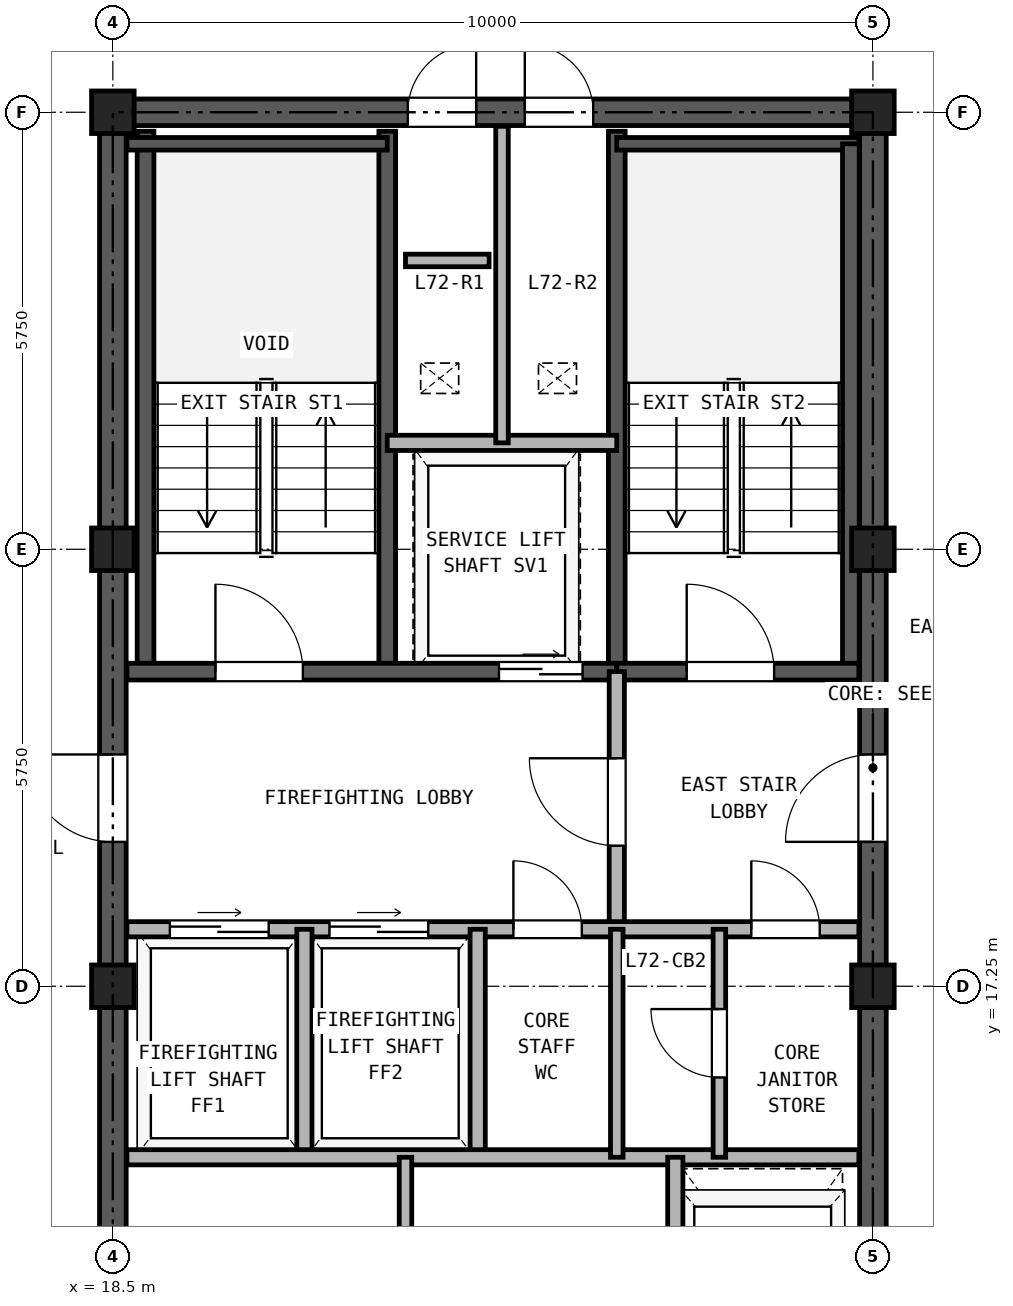
"""IFC4 building model, lengths in metres.
Left out: names, types, materials, properties, quantities, classifications, styles, units other than length and angle.
Written with IfcOpenShell. Run it as: python <this file> out.ifc"""

import sys

from ifc_helpers import new_model, si_unit, direction, frame, frame_2d, origin, origin_2d, place, context, subcontext, project, spatial, rectangle, hollow_rectangle, extrude, source, transform, mapped, element, fill, save


model = new_model("IFC4")
c1 = context("Model", 3, precision=1e-05, world=origin(), true_north=direction((0.0, 1.0)))
c2 = subcontext(c1, "Body", "Model", "MODEL_VIEW")
j1 = project(units=[si_unit("LENGTHUNIT", "METRE"), si_unit("PLANEANGLEUNIT", "RADIAN")], contexts=[c1])
p1 = place(None, origin())
s1 = spatial("IfcSite", under=j1, at=p1, CompositionType="ELEMENT")
p2 = place(p1, origin())
s2 = spatial("IfcBuilding", under=s1, at=p2, CompositionType="ELEMENT")
p3 = place(p2, frame((0.0, 0.0, 252.1)))
s3 = spatial("IfcBuildingStorey", under=s2, at=p3, CompositionType="ELEMENT", Elevation=252.1)
m1 = source(origin(), c2, "Body", "SweptSolid", [
    extrude(hollow_rectangle(XDim=0.56, YDim=0.56, WallThickness=0.03, at=origin_2d()), origin(), (0.0, 0.0, 1.0), 2.98),
])
for number, where, z_axis, x_axis in (
    (1, (18.5, 17.25, 0.0), (0.0, 0.0, 1.0), (1.0, 0.0, 0.0)),
    (2, (18.5, 23.0, 0.0), (0.0, 0.0, 1.0), (1.0, 0.0, 0.0)),
    (3, (18.5, 28.75, 0.0), (0.0, 0.0, 1.0), (1.0, 0.0, 0.0)),
    (4, (28.5, 17.25, 0.0), (0.0, 0.0, 1.0), (1.0, 0.0, 0.0)),
    (5, (28.5, 23.0, 0.0), (0.0, 0.0, 1.0), (1.0, 0.0, 0.0)),
    (6, (28.5, 28.75, 0.0), (0.0, 0.0, 1.0), (1.0, 0.0, 0.0)),
):
    element("IfcColumn", number, at=place(p3, frame(where, z_axis=z_axis, x_axis=x_axis)), inside=s3, PredefinedType="COLUMN", context=c2, shape_type="MappedRepresentation", body=[
        mapped(m1, transform((0.0, 0.0, 0.0), x_axis=(1.0, 0.0, 0.0), y_axis=(0.0, 1.0, 0.0), z_axis=(0.0, 0.0, 1.0), scale=1.0)),
    ])
p4 = place(p3, frame((18.325, 28.75, 0.0), z_axis=(0.0, 0.0, 1.0), x_axis=(1.0, 0.0, 0.0)))
e7 = element("IfcWall", 7, at=p4, inside=s3, PredefinedType="SHEAR", context=c2, shape_type="SweptSolid", body=[
    extrude(rectangle(XDim=10.35, YDim=0.35, at=frame_2d((5.175, 0.0))), origin(), (0.0, 0.0, 1.0), 2.98),
])
p5 = place(p4, frame((4.055, 0.0, 0.0)))
e8 = element("IfcOpeningElement", 8, at=p5, cuts=e7, PredefinedType="OPENING", context=c2, shape_type="SweptSolid", body=[
    extrude(rectangle(XDim=0.9, YDim=2.05, at=frame_2d((0.45, 1.025))), frame((0.0, 0.185, 0.0), z_axis=(0.0, -1.0, 0.0), x_axis=(1.0, 0.0, 0.0)), (0.0, 0.0, 1.0), 0.37),
])
p6 = place(p4, frame((5.595, 0.0, 0.0)))
e9 = element("IfcOpeningElement", 9, at=p6, cuts=e7, PredefinedType="OPENING", context=c2, shape_type="SweptSolid", body=[
    extrude(rectangle(XDim=0.9, YDim=2.05, at=frame_2d((0.45, 1.025))), frame((0.0, 0.185, 0.0), z_axis=(0.0, -1.0, 0.0), x_axis=(1.0, 0.0, 0.0)), (0.0, 0.0, 1.0), 0.37),
])
p7 = place(p3, frame((18.5, 11.675, 0.0), z_axis=(0.0, 0.0, 1.0), x_axis=(0.0, 1.0, 0.0)))
e10 = element("IfcWall", 10, at=p7, inside=s3, PredefinedType="SHEAR", context=c2, shape_type="SweptSolid", body=[
    extrude(rectangle(XDim=16.9, YDim=0.35, at=frame_2d((8.45, 0.0))), origin(), (0.0, 0.0, 1.0), 2.98),
])
p8 = place(p7, frame((7.475, 0.0, 0.0)))
e11 = element("IfcOpeningElement", 11, at=p8, cuts=e10, PredefinedType="OPENING", context=c2, shape_type="SweptSolid", body=[
    extrude(rectangle(XDim=1.15, YDim=2.2, at=frame_2d((0.575, 1.1))), frame((0.0, 0.185, 0.0), z_axis=(0.0, -1.0, 0.0), x_axis=(1.0, 0.0, 0.0)), (0.0, 0.0, 1.0), 0.37),
])
p9 = place(p3, frame((28.5, 11.675, 0.0), z_axis=(0.0, 0.0, 1.0), x_axis=(0.0, 1.0, 0.0)))
e12 = element("IfcWall", 12, at=p9, inside=s3, PredefinedType="SHEAR", context=c2, shape_type="SweptSolid", body=[
    extrude(rectangle(XDim=16.9, YDim=0.35, at=frame_2d((8.45, 0.0))), origin(), (0.0, 0.0, 1.0), 2.98),
])
p10 = place(p9, frame((7.475, 0.0, 0.0)))
e13 = element("IfcOpeningElement", 13, at=p10, cuts=e12, PredefinedType="OPENING", context=c2, shape_type="SweptSolid", body=[
    extrude(rectangle(XDim=1.15, YDim=2.2, at=frame_2d((0.575, 1.1))), frame((0.0, 0.185, 0.0), z_axis=(0.0, -1.0, 0.0), x_axis=(1.0, 0.0, 0.0)), (0.0, 0.0, 1.0), 0.37),
])
for number, where, z_axis, x_axis in (
    (14, (18.93, 21.39, 0.0), (0.0, 0.0, 1.0), (0.0, 1.0, 0.0)),
    (15, (22.11, 21.39, 0.0), (0.0, 0.0, 1.0), (0.0, 1.0, 0.0)),
    (16, (25.13, 21.39, 0.0), (0.0, 0.0, 1.0), (0.0, 1.0, 0.0)),
):
    element("IfcWall", number, at=place(p3, frame(where, z_axis=z_axis, x_axis=x_axis)), inside=s3, PredefinedType="SOLIDWALL", context=c2, shape_type="SweptSolid", body=[
        extrude(rectangle(XDim=7.11, YDim=0.22, at=frame_2d((3.555, 0.0))), origin(), (0.0, 0.0, 1.0), 2.98),
    ])
p11 = place(p3, frame((18.685, 28.335, 0.0), z_axis=(0.0, 0.0, 1.0), x_axis=(1.0, 0.0, 0.0)))
e17 = element("IfcWall", 17, at=p11, inside=s3, PredefinedType="PARTITIONING", context=c2, shape_type="SweptSolid", body=[
    extrude(rectangle(XDim=3.425, YDim=0.165, at=frame_2d((1.712, 0.0))), origin(), (0.0, 0.0, 1.0), 2.98),
])
p12 = place(p3, frame((25.13, 28.335, 0.0), z_axis=(0.0, 0.0, 1.0), x_axis=(1.0, 0.0, 0.0)))
e18 = element("IfcWall", 18, at=p12, inside=s3, PredefinedType="PARTITIONING", context=c2, shape_type="SweptSolid", body=[
    extrude(rectangle(XDim=3.185, YDim=0.165, at=frame_2d((1.593, 0.0))), origin(), (0.0, 0.0, 1.0), 2.98),
])
p13 = place(p3, frame((28.21, 21.39, 0.0), z_axis=(0.0, 0.0, 1.0), x_axis=(0.0, 1.0, 0.0)))
e19 = element("IfcWall", 19, at=p13, inside=s3, PredefinedType="SOLIDWALL", context=c2, shape_type="SweptSolid", body=[
    extrude(rectangle(XDim=6.945, YDim=0.22, at=frame_2d((3.473, 0.0))), origin(), (0.0, 0.0, 1.0), 2.98),
])
p14 = place(p3, frame((18.685, 21.39, 0.0), z_axis=(0.0, 0.0, 1.0), x_axis=(1.0, 0.0, 0.0)))
e20 = element("IfcWall", 20, at=p14, inside=s3, PredefinedType="SOLIDWALL", context=c2, shape_type="SweptSolid", body=[
    extrude(rectangle(XDim=6.445, YDim=0.22, at=frame_2d((3.222, 0.0))), origin(), (0.0, 0.0, 1.0), 2.98),
])
p15 = place(p14, frame((1.165, 0.0, 0.0)))
e21 = element("IfcOpeningElement", 21, at=p15, cuts=e20, PredefinedType="OPENING", context=c2, shape_type="SweptSolid", body=[
    extrude(rectangle(XDim=1.15, YDim=2.2, at=frame_2d((0.575, 1.1))), frame((0.0, 0.12, 0.0), z_axis=(0.0, -1.0, 0.0), x_axis=(1.0, 0.0, 0.0)), (0.0, 0.0, 1.0), 0.24),
])
p16 = place(p14, frame((4.895, 0.0, 0.0)))
e22 = element("IfcOpeningElement", 22, at=p16, cuts=e20, PredefinedType="OPENING", context=c2, shape_type="SweptSolid", body=[
    extrude(rectangle(XDim=1.1, YDim=2.25, at=frame_2d((0.55, 1.125))), frame((0.0, 0.12, 0.0), z_axis=(0.0, -1.0, 0.0), x_axis=(1.0, 0.0, 0.0)), (0.0, 0.0, 1.0), 0.24),
])
p17 = place(p3, frame((25.13, 21.39, 0.0), z_axis=(0.0, 0.0, 1.0), x_axis=(1.0, 0.0, 0.0)))
e23 = element("IfcWall", 23, at=p17, inside=s3, PredefinedType="SOLIDWALL", context=c2, shape_type="SweptSolid", body=[
    extrude(rectangle(XDim=3.185, YDim=0.22, at=frame_2d((1.593, 0.0))), origin(), (0.0, 0.0, 1.0), 2.98),
])
p18 = place(p17, frame((0.92, 0.0, 0.0)))
e24 = element("IfcOpeningElement", 24, at=p18, cuts=e23, PredefinedType="OPENING", context=c2, shape_type="SweptSolid", body=[
    extrude(rectangle(XDim=1.15, YDim=2.2, at=frame_2d((0.575, 1.1))), frame((0.0, 0.12, 0.0), z_axis=(0.0, -1.0, 0.0), x_axis=(1.0, 0.0, 0.0)), (0.0, 0.0, 1.0), 0.24),
])
p19 = place(p3, frame((22.11, 24.4, 0.0), z_axis=(0.0, 0.0, 1.0), x_axis=(1.0, 0.0, 0.0)))
e25 = element("IfcWall", 25, at=p19, inside=s3, PredefinedType="PARTITIONING", context=c2, shape_type="SweptSolid", body=[
    extrude(rectangle(XDim=3.02, YDim=0.2, at=frame_2d((1.51, 0.0))), origin(), (0.0, 0.0, 1.0), 2.98),
])
p20 = place(p3, frame((23.62, 24.4, 0.0), z_axis=(0.0, 0.0, 1.0), x_axis=(0.0, 1.0, 0.0)))
e26 = element("IfcWall", 26, at=p20, inside=s3, PredefinedType="PARTITIONING", context=c2, shape_type="SweptSolid", body=[
    extrude(rectangle(XDim=4.165, YDim=0.165, at=frame_2d((2.083, 0.0))), origin(), (0.0, 0.0, 1.0), 2.98),
])
p21 = place(p3, frame((25.13, 18.0, 0.0), z_axis=(0.0, 0.0, 1.0), x_axis=(0.0, 1.0, 0.0)))
e27 = element("IfcWall", 27, at=p21, inside=s3, PredefinedType="PARTITIONING", context=c2, shape_type="SweptSolid", body=[
    extrude(rectangle(XDim=3.39, YDim=0.2, at=frame_2d((1.695, 0.0))), origin(), (0.0, 0.0, 1.0), 2.98),
])
p22 = place(p21, frame((1.1, 0.0, 0.0)))
e28 = element("IfcOpeningElement", 28, at=p22, cuts=e27, PredefinedType="OPENING", context=c2, shape_type="SweptSolid", body=[
    extrude(rectangle(XDim=1.15, YDim=2.2, at=frame_2d((0.575, 1.1))), frame((0.0, 0.11, 0.0), z_axis=(0.0, -1.0, 0.0), x_axis=(1.0, 0.0, 0.0)), (0.0, 0.0, 1.0), 0.22),
])
p23 = place(p3, frame((18.685, 18.0, 0.0), z_axis=(0.0, 0.0, 1.0), x_axis=(1.0, 0.0, 0.0)))
e29 = element("IfcWall", 29, at=p23, inside=s3, PredefinedType="PARTITIONING", context=c2, shape_type="SweptSolid", body=[
    extrude(rectangle(XDim=9.63, YDim=0.2, at=frame_2d((4.815, 0.0))), origin(), (0.0, 0.0, 1.0), 2.98),
])
p24 = place(p23, frame((0.565, 0.0, 0.0)))
e30 = element("IfcOpeningElement", 30, at=p24, cuts=e29, PredefinedType="OPENING", context=c2, shape_type="SweptSolid", body=[
    extrude(rectangle(XDim=1.3, YDim=2.3, at=frame_2d((0.65, 1.15))), frame((0.0, 0.11, 0.0), z_axis=(0.0, -1.0, 0.0), x_axis=(1.0, 0.0, 0.0)), (0.0, 0.0, 1.0), 0.22),
])
p25 = place(p23, frame((2.665, 0.0, 0.0)))
e31 = element("IfcOpeningElement", 31, at=p25, cuts=e29, PredefinedType="OPENING", context=c2, shape_type="SweptSolid", body=[
    extrude(rectangle(XDim=1.3, YDim=2.3, at=frame_2d((0.65, 1.15))), frame((0.0, 0.11, 0.0), z_axis=(0.0, -1.0, 0.0), x_axis=(1.0, 0.0, 0.0)), (0.0, 0.0, 1.0), 0.22),
])
p26 = place(p23, frame((5.085, 0.0, 0.0)))
e32 = element("IfcOpeningElement", 32, at=p26, cuts=e29, PredefinedType="OPENING", context=c2, shape_type="SweptSolid", body=[
    extrude(rectangle(XDim=0.9, YDim=2.05, at=frame_2d((0.45, 1.025))), frame((0.0, 0.11, 0.0), z_axis=(0.0, -1.0, 0.0), x_axis=(1.0, 0.0, 0.0)), (0.0, 0.0, 1.0), 0.22),
])
p27 = place(p23, frame((8.215, 0.0, 0.0)))
e33 = element("IfcOpeningElement", 33, at=p27, cuts=e29, PredefinedType="OPENING", context=c2, shape_type="SweptSolid", body=[
    extrude(rectangle(XDim=0.9, YDim=2.05, at=frame_2d((0.45, 1.025))), frame((0.0, 0.11, 0.0), z_axis=(0.0, -1.0, 0.0), x_axis=(1.0, 0.0, 0.0)), (0.0, 0.0, 1.0), 0.22),
])
for number, where, z_axis, x_axis in (
    (34, (21.02, 15.0, 0.0), (0.0, 0.0, 1.0), (0.0, 1.0, 0.0)),
    (35, (23.3, 15.0, 0.0), (0.0, 0.0, 1.0), (0.0, 1.0, 0.0)),
):
    element("IfcWall", number, at=place(p3, frame(where, z_axis=z_axis, x_axis=x_axis)), inside=s3, PredefinedType="PARTITIONING", context=c2, shape_type="SweptSolid", body=[
        extrude(rectangle(XDim=3.0, YDim=0.2, at=frame_2d((1.5, 0.0))), origin(), (0.0, 0.0, 1.0), 2.98),
    ])
p28 = place(p3, frame((18.685, 15.0, 0.0), z_axis=(0.0, 0.0, 1.0), x_axis=(1.0, 0.0, 0.0)))
e36 = element("IfcWall", 36, at=p28, inside=s3, PredefinedType="PARTITIONING", context=c2, shape_type="SweptSolid", body=[
    extrude(rectangle(XDim=9.63, YDim=0.2, at=frame_2d((4.815, 0.0))), origin(), (0.0, 0.0, 1.0), 2.98),
])
p29 = place(p3, frame((25.13, 15.0, 0.0), z_axis=(0.0, 0.0, 1.0), x_axis=(0.0, 1.0, 0.0)))
e37 = element("IfcWall", 37, at=p29, inside=s3, PredefinedType="PARTITIONING", context=c2, shape_type="SweptSolid", body=[
    extrude(rectangle(XDim=3.0, YDim=0.165, at=frame_2d((1.5, 0.0))), origin(), (0.0, 0.0, 1.0), 2.98),
])
p30 = place(p3, frame((26.48, 15.0, 0.0), z_axis=(0.0, 0.0, 1.0), x_axis=(0.0, 1.0, 0.0)))
e38 = element("IfcWall", 38, at=p30, inside=s3, PredefinedType="PARTITIONING", context=c2, shape_type="SweptSolid", body=[
    extrude(rectangle(XDim=3.0, YDim=0.165, at=frame_2d((1.5, 0.0))), origin(), (0.0, 0.0, 1.0), 2.98),
])
p31 = place(p30, frame((1.05, 0.0, 0.0)))
e39 = element("IfcOpeningElement", 39, at=p31, cuts=e38, PredefinedType="OPENING", context=c2, shape_type="SweptSolid", body=[
    extrude(rectangle(XDim=0.9, YDim=2.05, at=frame_2d((0.45, 1.025))), frame((0.0, 0.093, 0.0), z_axis=(0.0, -1.0, 0.0), x_axis=(1.0, 0.0, 0.0)), (0.0, 0.0, 1.0), 0.185),
])
p32 = place(p3, frame((22.35, 11.685, 0.0), z_axis=(0.0, 0.0, 1.0), x_axis=(0.0, 1.0, 0.0)))
e40 = element("IfcWall", 40, at=p32, inside=s3, PredefinedType="PARTITIONING", context=c2, shape_type="SweptSolid", body=[
    extrude(rectangle(XDim=3.315, YDim=0.165, at=frame_2d((1.657, 0.0))), origin(), (0.0, 0.0, 1.0), 2.98),
])
p33 = place(p3, frame((25.9, 11.685, 0.0), z_axis=(0.0, 0.0, 1.0), x_axis=(0.0, 1.0, 0.0)))
e41 = element("IfcWall", 41, at=p33, inside=s3, PredefinedType="PARTITIONING", context=c2, shape_type="SweptSolid", body=[
    extrude(rectangle(XDim=3.315, YDim=0.2, at=frame_2d((1.657, 0.0))), origin(), (0.0, 0.0, 1.0), 2.98),
])
p34 = place(p3, frame((22.35, 26.8, 0.0), z_axis=(0.0, 0.0, 1.0), x_axis=(1.0, 0.0, 0.0)))
e42 = element("IfcWall", 42, at=p34, inside=s3, PredefinedType="PARTITIONING", context=c2, shape_type="SweptSolid", body=[
    extrude(rectangle(XDim=1.1, YDim=0.165, at=frame_2d((0.55, 0.0))), origin(), (0.0, 0.0, 1.0), 2.98),
])
p35 = place(p15, frame((1.15, 0.0, 0.0), z_axis=(0.0, 0.0, 1.0), x_axis=(-1.0, 0.0, 0.0)))
e43 = element("IfcDoor", 43, at=p35, inside=s3, OperationType="SINGLE_SWING_LEFT", PredefinedType="DOOR", context=c2, shape_type="SweptSolid", body=[
    extrude(rectangle(XDim=1.15, YDim=2.2, at=frame_2d((0.575, 1.1))), frame((0.0, 0.025, 0.0), z_axis=(0.0, -1.0, 0.0), x_axis=(1.0, 0.0, 0.0)), (0.0, 0.0, 1.0), 0.05),
])
fill(e21, e43)
p36 = place(p18, frame((1.15, 0.0, 0.0), z_axis=(0.0, 0.0, 1.0), x_axis=(-1.0, 0.0, 0.0)))
e44 = element("IfcDoor", 44, at=p36, inside=s3, OperationType="SINGLE_SWING_LEFT", PredefinedType="DOOR", context=c2, shape_type="SweptSolid", body=[
    extrude(rectangle(XDim=1.15, YDim=2.2, at=frame_2d((0.575, 1.1))), frame((0.0, 0.025, 0.0), z_axis=(0.0, -1.0, 0.0), x_axis=(1.0, 0.0, 0.0)), (0.0, 0.0, 1.0), 0.05),
])
fill(e24, e44)
p37 = place(p16, frame((1.1, 0.0, 0.0), z_axis=(0.0, 0.0, 1.0), x_axis=(-1.0, 0.0, 0.0)))
e45 = element("IfcDoor", 45, at=p37, inside=s3, OperationType="DOUBLE_DOOR_SLIDING", PredefinedType="DOOR", context=c2, shape_type="SweptSolid", body=[
    extrude(rectangle(XDim=1.1, YDim=2.25, at=frame_2d((0.55, 1.125))), frame((0.0, 0.025, 0.0), z_axis=(0.0, -1.0, 0.0), x_axis=(1.0, 0.0, 0.0)), (0.0, 0.0, 1.0), 0.05),
])
fill(e22, e45)
p38 = place(p22, origin())
e46 = element("IfcDoor", 46, at=p38, inside=s3, OperationType="SINGLE_SWING_RIGHT", PredefinedType="DOOR", context=c2, shape_type="SweptSolid", body=[
    extrude(rectangle(XDim=1.15, YDim=2.2, at=frame_2d((0.575, 1.1))), frame((0.0, 0.025, 0.0), z_axis=(0.0, -1.0, 0.0), x_axis=(1.0, 0.0, 0.0)), (0.0, 0.0, 1.0), 0.05),
])
fill(e28, e46)
p39 = place(p24, origin())
e47 = element("IfcDoor", 47, at=p39, inside=s3, OperationType="DOUBLE_DOOR_SLIDING", PredefinedType="DOOR", context=c2, shape_type="SweptSolid", body=[
    extrude(rectangle(XDim=1.3, YDim=2.3, at=frame_2d((0.65, 1.15))), frame((0.0, 0.025, 0.0), z_axis=(0.0, -1.0, 0.0), x_axis=(1.0, 0.0, 0.0)), (0.0, 0.0, 1.0), 0.05),
])
fill(e30, e47)
p40 = place(p25, origin())
e48 = element("IfcDoor", 48, at=p40, inside=s3, OperationType="DOUBLE_DOOR_SLIDING", PredefinedType="DOOR", context=c2, shape_type="SweptSolid", body=[
    extrude(rectangle(XDim=1.3, YDim=2.3, at=frame_2d((0.65, 1.15))), frame((0.0, 0.025, 0.0), z_axis=(0.0, -1.0, 0.0), x_axis=(1.0, 0.0, 0.0)), (0.0, 0.0, 1.0), 0.05),
])
fill(e31, e48)
p41 = place(p26, frame((0.9, 0.0, 0.0), z_axis=(0.0, 0.0, 1.0), x_axis=(-1.0, 0.0, 0.0)))
e49 = element("IfcDoor", 49, at=p41, inside=s3, OperationType="SINGLE_SWING_LEFT", PredefinedType="DOOR", context=c2, shape_type="SweptSolid", body=[
    extrude(rectangle(XDim=0.9, YDim=2.05, at=frame_2d((0.45, 1.025))), frame((0.0, 0.025, 0.0), z_axis=(0.0, -1.0, 0.0), x_axis=(1.0, 0.0, 0.0)), (0.0, 0.0, 1.0), 0.05),
])
fill(e32, e49)
p42 = place(p31, origin())
e50 = element("IfcDoor", 50, at=p42, inside=s3, OperationType="SINGLE_SWING_RIGHT", PredefinedType="DOOR", context=c2, shape_type="SweptSolid", body=[
    extrude(rectangle(XDim=0.9, YDim=2.05, at=frame_2d((0.45, 1.025))), frame((0.0, 0.025, 0.0), z_axis=(0.0, -1.0, 0.0), x_axis=(1.0, 0.0, 0.0)), (0.0, 0.0, 1.0), 0.05),
])
fill(e39, e50)
p43 = place(p27, frame((0.9, 0.0, 0.0), z_axis=(0.0, 0.0, 1.0), x_axis=(-1.0, 0.0, 0.0)))
e51 = element("IfcDoor", 51, at=p43, inside=s3, OperationType="SINGLE_SWING_LEFT", PredefinedType="DOOR", context=c2, shape_type="SweptSolid", body=[
    extrude(rectangle(XDim=0.9, YDim=2.05, at=frame_2d((0.45, 1.025))), frame((0.0, 0.025, 0.0), z_axis=(0.0, -1.0, 0.0), x_axis=(1.0, 0.0, 0.0)), (0.0, 0.0, 1.0), 0.05),
])
fill(e33, e51)
p44 = place(p8, frame((1.15, 0.0, 0.0), z_axis=(0.0, 0.0, 1.0), x_axis=(-1.0, 0.0, 0.0)))
e52 = element("IfcDoor", 52, at=p44, inside=s3, OperationType="SINGLE_SWING_RIGHT", PredefinedType="DOOR", context=c2, shape_type="SweptSolid", body=[
    extrude(rectangle(XDim=1.15, YDim=2.2, at=frame_2d((0.575, 1.1))), frame((0.0, 0.025, 0.0), z_axis=(0.0, -1.0, 0.0), x_axis=(1.0, 0.0, 0.0)), (0.0, 0.0, 1.0), 0.05),
])
fill(e11, e52)
p45 = place(p10, origin())
e53 = element("IfcDoor", 53, at=p45, inside=s3, OperationType="SINGLE_SWING_LEFT", PredefinedType="DOOR", context=c2, shape_type="SweptSolid", body=[
    extrude(rectangle(XDim=1.15, YDim=2.2, at=frame_2d((0.575, 1.1))), frame((0.0, 0.025, 0.0), z_axis=(0.0, -1.0, 0.0), x_axis=(1.0, 0.0, 0.0)), (0.0, 0.0, 1.0), 0.05),
])
fill(e13, e53)
p46 = place(p5, origin())
e54 = element("IfcDoor", 54, at=p46, inside=s3, OperationType="SINGLE_SWING_RIGHT", PredefinedType="DOOR", context=c2, shape_type="SweptSolid", body=[
    extrude(rectangle(XDim=0.9, YDim=2.05, at=frame_2d((0.45, 1.025))), frame((0.0, 0.025, 0.0), z_axis=(0.0, -1.0, 0.0), x_axis=(1.0, 0.0, 0.0)), (0.0, 0.0, 1.0), 0.05),
])
fill(e8, e54)
p47 = place(p6, origin())
e55 = element("IfcDoor", 55, at=p47, inside=s3, OperationType="SINGLE_SWING_LEFT", PredefinedType="DOOR", context=c2, shape_type="SweptSolid", body=[
    extrude(rectangle(XDim=0.9, YDim=2.05, at=frame_2d((0.45, 1.025))), frame((0.0, 0.025, 0.0), z_axis=(0.0, -1.0, 0.0), x_axis=(1.0, 0.0, 0.0)), (0.0, 0.0, 1.0), 0.05),
])
fill(e9, e55)
save(model, sys.argv[1])
